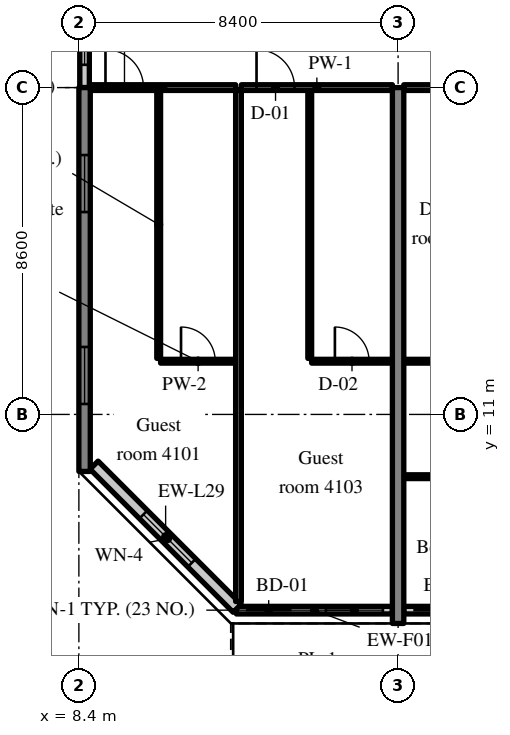
"""IFC4 building model, lengths in metres.
Left out: names, types, materials, properties, quantities, classifications, styles, units other than length and angle.
Written with IfcOpenShell. Run it as: python <this file> out.ifc"""

import sys

from ifc_helpers import new_model, si_unit, direction, frame, frame_2d, origin, place, context, subcontext, project, spatial, rectangle, extrude, source, transform, mapped, element, fill, save


model = new_model("IFC4")
c1 = context("Model", 3, precision=1e-05, world=origin(), true_north=direction((0.0, 1.0)))
c2 = subcontext(c1, "Body", "Model", "MODEL_VIEW")
j1 = project(units=[si_unit("LENGTHUNIT", "METRE"), si_unit("PLANEANGLEUNIT", "RADIAN")], contexts=[c1])
p1 = place(None, origin())
s1 = spatial("IfcSite", under=j1, at=p1, CompositionType="ELEMENT")
p2 = place(p1, origin())
s2 = spatial("IfcBuilding", under=s1, at=p2, CompositionType="ELEMENT")
p3 = place(p2, frame((0.0, 0.0, 170.6)))
s3 = spatial("IfcBuildingStorey", under=s2, at=p3, CompositionType="ELEMENT", Elevation=170.6)
m1 = source(origin(), c2, "Body", "SweptSolid", [
    extrude(rectangle(XDim=10.1, YDim=0.3, at=frame_2d((5.05, 0.0))), origin(), (0.0, 0.0, 1.0), 3.52),
])
p4 = place(p3, frame((8.55, 9.5, 0.0), z_axis=(0.0, 0.0, 1.0), x_axis=(0.0, 1.0, 0.0)))
e1 = element("IfcWall", 1, at=p4, inside=s3, PredefinedType="SHEAR", context=c2, shape_type="MappedRepresentation", body=[
    mapped(m1, transform((0.0, 0.0, 0.0), scale=1.0)),
])
m2 = source(origin(), c2, "Body", "SweptSolid", [
    extrude(rectangle(XDim=1.5, YDim=1.5, at=frame_2d((0.75, 0.75))), frame((0.0, 0.16, 0.0), z_axis=(0.0, -1.0, 0.0), x_axis=(1.0, 0.0, 0.0)), (0.0, 0.0, 1.0), 0.32),
])
p5 = place(p4, frame((1.775, 0.0, 0.9)))
e2 = element("IfcOpeningElement", 2, at=p5, cuts=e1, PredefinedType="OPENING", context=c2, shape_type="MappedRepresentation", body=[
    mapped(m2, transform((0.0, 0.0, 0.0), scale=1.0)),
])
p6 = place(p4, frame((6.825, 0.0, 0.9)))
e3 = element("IfcOpeningElement", 3, at=p6, cuts=e1, PredefinedType="OPENING", context=c2, shape_type="MappedRepresentation", body=[
    mapped(m2, transform((0.0, 0.0, 0.0), scale=1.0)),
])
m3 = source(origin(), c2, "Body", "SweptSolid", [
    extrude(rectangle(XDim=14.1, YDim=0.3, at=frame_2d((7.05, 0.0))), origin(), (0.0, 0.0, 1.0), 3.52),
])
p7 = place(p3, frame((16.8, 5.5, 0.0), z_axis=(0.0, 0.0, 1.0), x_axis=(0.0, 1.0, 0.0)))
e4 = element("IfcWall", 4, at=p7, inside=s3, PredefinedType="SHEAR", context=c2, shape_type="MappedRepresentation", body=[
    mapped(m3, transform((0.0, 0.0, 0.0), scale=1.0)),
])
m4 = source(origin(), c2, "Body", "SweptSolid", [
    extrude(rectangle(XDim=4.105, YDim=0.2, at=frame_2d((2.052, 0.0))), origin(), (0.0, 0.0, 1.0), 2.87),
])
p8 = place(p3, frame((12.545, 5.85, 0.0), z_axis=(0.0, 0.0, 1.0), x_axis=(1.0, 0.0, 0.0)))
e5 = element("IfcWall", 5, at=p8, inside=s3, PredefinedType="SOLIDWALL", context=c2, shape_type="MappedRepresentation", body=[
    mapped(m4, transform((0.0, 0.0, 0.0), scale=1.0)),
])
m5 = source(origin(), c2, "Body", "SweptSolid", [
    extrude(rectangle(XDim=1.2, YDim=2.4, at=frame_2d((0.6, 1.2))), frame((0.0, 0.11, 0.0), z_axis=(0.0, -1.0, 0.0), x_axis=(1.0, 0.0, 0.0)), (0.0, 0.0, 1.0), 0.22),
])
p9 = place(p8, frame((0.25, 0.0, 0.0)))
e6 = element("IfcOpeningElement", 6, at=p9, cuts=e5, PredefinedType="OPENING", context=c2, shape_type="MappedRepresentation", body=[
    mapped(m5, transform((0.0, 0.0, 0.0), scale=1.0)),
])
m6 = source(origin(), c2, "Body", "SweptSolid", [
    extrude(rectangle(XDim=1.5, YDim=1.5, at=frame_2d((0.75, 0.75))), frame((0.0, 0.11, 0.0), z_axis=(0.0, -1.0, 0.0), x_axis=(1.0, 0.0, 0.0)), (0.0, 0.0, 1.0), 0.22),
])
p10 = place(p8, frame((2.355, 0.0, 0.9)))
e7 = element("IfcOpeningElement", 7, at=p10, cuts=e5, PredefinedType="OPENING", context=c2, shape_type="MappedRepresentation", body=[
    mapped(m6, transform((0.0, 0.0, 0.0), scale=1.0)),
])
m7 = source(origin(), c2, "Body", "SweptSolid", [
    extrude(rectangle(XDim=8.1, YDim=0.2, at=frame_2d((4.05, 0.0))), origin(), (0.0, 0.0, 1.0), 2.87),
])
p11 = place(p3, frame((16.95, 5.85, 0.0), z_axis=(0.0, 0.0, 1.0), x_axis=(1.0, 0.0, 0.0)))
e8 = element("IfcWall", 8, at=p11, inside=s3, PredefinedType="SOLIDWALL", context=c2, shape_type="MappedRepresentation", body=[
    mapped(m7, transform((0.0, 0.0, 0.0), scale=1.0)),
])
p12 = place(p11, frame((0.25, 0.0, 0.0)))
e9 = element("IfcOpeningElement", 9, at=p12, cuts=e8, PredefinedType="OPENING", context=c2, shape_type="MappedRepresentation", body=[
    mapped(m5, transform((0.0, 0.0, 0.0), scale=1.0)),
])
p13 = place(p11, frame((2.3, 0.0, 0.9)))
e10 = element("IfcOpeningElement", 10, at=p13, cuts=e8, PredefinedType="OPENING", context=c2, shape_type="MappedRepresentation", body=[
    mapped(m6, transform((0.0, 0.0, 0.0), scale=1.0)),
])
p14 = place(p11, frame((4.3, 0.0, 0.0)))
e11 = element("IfcOpeningElement", 11, at=p14, cuts=e8, PredefinedType="OPENING", context=c2, shape_type="MappedRepresentation", body=[
    mapped(m5, transform((0.0, 0.0, 0.0), scale=1.0)),
])
p15 = place(p11, frame((6.35, 0.0, 0.9)))
e12 = element("IfcOpeningElement", 12, at=p15, cuts=e8, PredefinedType="OPENING", context=c2, shape_type="MappedRepresentation", body=[
    mapped(m6, transform((0.0, 0.0, 0.0), scale=1.0)),
])
m8 = source(origin(), c2, "Body", "SweptSolid", [
    extrude(rectangle(XDim=5.326, YDim=0.3, at=frame_2d((2.663, 0.0))), origin(), (0.0, 0.0, 1.0), 3.52),
])
p16 = place(p3, frame((8.8, 9.666, 0.0), z_axis=(0.0, 0.0, 1.0), x_axis=(0.707083859269, -0.707129702361, 0.0)))
e13 = element("IfcWall", 13, at=p16, inside=s3, PredefinedType="SOLIDWALL", context=c2, shape_type="MappedRepresentation", body=[
    mapped(m8, transform((0.0, 0.0, 0.0), scale=1.0)),
])
m9 = source(origin(), c2, "Body", "SweptSolid", [
    extrude(rectangle(XDim=1.8, YDim=1.5, at=frame_2d((0.9, 0.75))), frame((0.0, 0.16, 0.0), z_axis=(0.0, -1.0, 0.0), x_axis=(1.0, 0.0, 0.0)), (0.0, 0.0, 1.0), 0.32),
])
p17 = place(p16, frame((1.836, 0.0, 0.9)))
e14 = element("IfcOpeningElement", 14, at=p17, cuts=e13, PredefinedType="OPENING", context=c2, shape_type="MappedRepresentation", body=[
    mapped(m9, transform((0.0, 0.0, 0.0), scale=1.0)),
])
m10 = source(origin(), c2, "Body", "SweptSolid", [
    extrude(rectangle(XDim=2.4, YDim=0.25, at=frame_2d((1.2, 0.0))), origin(), (0.0, 0.0, 1.0), 2.62),
])
p18 = place(p3, frame((8.55, 19.6, 0.0), z_axis=(0.0, 0.0, 1.0), x_axis=(0.0, 1.0, 0.0)))
e15 = element("IfcWall", 15, at=p18, inside=s3, PredefinedType="SOLIDWALL", context=c2, shape_type="MappedRepresentation", body=[
    mapped(m10, transform((0.0, 0.0, 0.0), scale=1.0)),
])
m11 = source(origin(), c2, "Body", "SweptSolid", [
    extrude(rectangle(XDim=1.2, YDim=1.5, at=frame_2d((0.6, 0.75))), frame((0.0, 0.135, 0.0), z_axis=(0.0, -1.0, 0.0), x_axis=(1.0, 0.0, 0.0)), (0.0, 0.0, 1.0), 0.27),
])
p19 = place(p18, frame((0.6, 0.0, 0.9)))
e16 = element("IfcOpeningElement", 16, at=p19, cuts=e15, PredefinedType="OPENING", context=c2, shape_type="MappedRepresentation", body=[
    mapped(m11, transform((0.0, 0.0, 0.0), scale=1.0)),
])
m12 = source(origin(), c2, "Body", "SweptSolid", [
    extrude(rectangle(XDim=7.05, YDim=0.1, at=frame_2d((3.525, 0.0))), origin(), (0.0, 0.0, 1.0), 3.52),
])
p20 = place(p3, frame((10.5, 12.475, 0.0), z_axis=(0.0, 0.0, 1.0), x_axis=(0.0, 1.0, 0.0)))
e17 = element("IfcWall", 17, at=p20, inside=s3, PredefinedType="PARTITIONING", context=c2, shape_type="MappedRepresentation", body=[
    mapped(m12, transform((0.0, 0.0, 0.0), scale=1.0)),
])
m13 = source(origin(), c2, "Body", "SweptSolid", [
    extrude(rectangle(XDim=1.975, YDim=0.1, at=frame_2d((0.987, 0.0))), origin(), (0.0, 0.0, 1.0), 3.52),
])
p21 = place(p3, frame((10.55, 12.4, 0.0), z_axis=(0.0, 0.0, 1.0), x_axis=(1.0, 0.0, 0.0)))
e18 = element("IfcWall", 18, at=p21, inside=s3, PredefinedType="PARTITIONING", context=c2, shape_type="MappedRepresentation", body=[
    mapped(m13, transform((0.0, 0.0, 0.0), scale=1.0)),
])
m14 = source(origin(), c2, "Body", "SweptSolid", [
    extrude(rectangle(XDim=0.9, YDim=2.1, at=frame_2d((0.45, 1.05))), frame((0.0, 0.06, 0.0), z_axis=(0.0, -1.0, 0.0), x_axis=(1.0, 0.0, 0.0)), (0.0, 0.0, 1.0), 0.12),
])
p22 = place(p21, frame((0.538, 0.0, 0.0)))
e19 = element("IfcOpeningElement", 19, at=p22, cuts=e18, PredefinedType="OPENING", context=c2, shape_type="MappedRepresentation", body=[
    mapped(m14, transform((0.0, 0.0, 0.0), scale=1.0)),
])
m15 = source(origin(), c2, "Body", "SweptSolid", [
    extrude(rectangle(XDim=3.825, YDim=0.15, at=frame_2d((1.913, 0.0))), origin(), (0.0, 0.0, 1.0), 2.82),
])
p23 = place(p3, frame((8.7, 19.6, 0.0), z_axis=(0.0, 0.0, 1.0), x_axis=(1.0, 0.0, 0.0)))
e20 = element("IfcWall", 20, at=p23, inside=s3, PredefinedType="PARTITIONING", context=c2, shape_type="MappedRepresentation", body=[
    mapped(m15, transform((0.0, 0.0, 0.0), scale=1.0)),
])
m16 = source(origin(), c2, "Body", "SweptSolid", [
    extrude(rectangle(XDim=1.0, YDim=2.1, at=frame_2d((0.5, 1.05))), frame((0.0, 0.085, 0.0), z_axis=(0.0, -1.0, 0.0), x_axis=(1.0, 0.0, 0.0)), (0.0, 0.0, 1.0), 0.17),
])
p24 = place(p23, frame((0.4, 0.0, 0.0)))
e21 = element("IfcOpeningElement", 21, at=p24, cuts=e20, PredefinedType="OPENING", context=c2, shape_type="MappedRepresentation", body=[
    mapped(m16, transform((0.0, 0.0, 0.0), scale=1.0)),
])
p25 = place(p3, frame((14.475, 12.475, 0.0), z_axis=(0.0, 0.0, 1.0), x_axis=(0.0, 1.0, 0.0)))
e22 = element("IfcWall", 22, at=p25, inside=s3, PredefinedType="PARTITIONING", context=c2, shape_type="MappedRepresentation", body=[
    mapped(m12, transform((0.0, 0.0, 0.0), scale=1.0)),
])
m17 = source(origin(), c2, "Body", "SweptSolid", [
    extrude(rectangle(XDim=2.125, YDim=0.1, at=frame_2d((1.062, 0.0))), origin(), (0.0, 0.0, 1.0), 3.52),
])
p26 = place(p3, frame((14.525, 12.4, 0.0), z_axis=(0.0, 0.0, 1.0), x_axis=(1.0, 0.0, 0.0)))
e23 = element("IfcWall", 23, at=p26, inside=s3, PredefinedType="PARTITIONING", context=c2, shape_type="MappedRepresentation", body=[
    mapped(m17, transform((0.0, 0.0, 0.0), scale=1.0)),
])
p27 = place(p26, frame((0.612, 0.0, 0.0)))
e24 = element("IfcOpeningElement", 24, at=p27, cuts=e23, PredefinedType="OPENING", context=c2, shape_type="MappedRepresentation", body=[
    mapped(m14, transform((0.0, 0.0, 0.0), scale=1.0)),
])
m18 = source(origin(), c2, "Body", "SweptSolid", [
    extrude(rectangle(XDim=3.975, YDim=0.15, at=frame_2d((1.987, 0.0))), origin(), (0.0, 0.0, 1.0), 2.82),
])
p28 = place(p3, frame((12.675, 19.6, 0.0), z_axis=(0.0, 0.0, 1.0), x_axis=(1.0, 0.0, 0.0)))
e25 = element("IfcWall", 25, at=p28, inside=s3, PredefinedType="PARTITIONING", context=c2, shape_type="MappedRepresentation", body=[
    mapped(m18, transform((0.0, 0.0, 0.0), scale=1.0)),
])
p29 = place(p28, frame((0.4, 0.0, 0.0)))
e26 = element("IfcOpeningElement", 26, at=p29, cuts=e25, PredefinedType="OPENING", context=c2, shape_type="MappedRepresentation", body=[
    mapped(m16, transform((0.0, 0.0, 0.0), scale=1.0)),
])
m19 = source(origin(), c2, "Body", "SweptSolid", [
    extrude(rectangle(XDim=13.447, YDim=0.15, at=frame_2d((6.724, 0.0))), origin(), (0.0, 0.0, 1.0), 3.52),
])
p30 = place(p3, frame((12.6, 6.078, 0.0), z_axis=(0.0, 0.0, 1.0), x_axis=(0.0, 1.0, 0.0)))
e27 = element("IfcWall", 27, at=p30, inside=s3, PredefinedType="PARTITIONING", context=c2, shape_type="MappedRepresentation", body=[
    mapped(m19, transform((0.0, 0.0, 0.0), scale=1.0)),
])
m20 = source(origin(), c2, "Body", "SweptSolid", [
    extrude(rectangle(XDim=2.65, YDim=0.1, at=frame_2d((1.325, 0.0))), origin(), (0.0, 0.0, 1.0), 3.52),
])
p31 = place(p3, frame((16.95, 12.4, 0.0), z_axis=(0.0, 0.0, 1.0), x_axis=(1.0, 0.0, 0.0)))
e28 = element("IfcWall", 28, at=p31, inside=s3, PredefinedType="PARTITIONING", context=c2, shape_type="MappedRepresentation", body=[
    mapped(m20, transform((0.0, 0.0, 0.0), scale=1.0)),
])
p32 = place(p31, frame((0.875, 0.0, 0.0)))
e29 = element("IfcOpeningElement", 29, at=p32, cuts=e28, PredefinedType="OPENING", context=c2, shape_type="MappedRepresentation", body=[
    mapped(m14, transform((0.0, 0.0, 0.0), scale=1.0)),
])
m21 = source(origin(), c2, "Body", "SweptSolid", [
    extrude(rectangle(XDim=8.1, YDim=0.1, at=frame_2d((4.05, 0.0))), origin(), (0.0, 0.0, 1.0), 3.52),
])
p33 = place(p3, frame((16.95, 9.362, 0.0), z_axis=(0.0, 0.0, 1.0), x_axis=(1.0, 0.0, 0.0)))
e30 = element("IfcWall", 30, at=p33, inside=s3, PredefinedType="PARTITIONING", context=c2, shape_type="MappedRepresentation", body=[
    mapped(m21, transform((0.0, 0.0, 0.0), scale=1.0)),
])
m22 = source(origin(), c2, "Body", "SweptSolid", [
    extrude(rectangle(XDim=1.8, YDim=2.1, at=frame_2d((0.9, 1.05))), frame((0.0, 0.06, 0.0), z_axis=(0.0, -1.0, 0.0), x_axis=(1.0, 0.0, 0.0)), (0.0, 0.0, 1.0), 0.12),
])
p34 = place(p33, frame((3.15, 0.0, 0.0)))
e31 = element("IfcOpeningElement", 31, at=p34, cuts=e30, PredefinedType="OPENING", context=c2, shape_type="MappedRepresentation", body=[
    mapped(m22, transform((0.0, 0.0, 0.0), scale=1.0)),
])
m23 = source(origin(), c2, "Body", "SweptSolid", [
    extrude(rectangle(XDim=8.1, YDim=0.15, at=frame_2d((4.05, 0.0))), origin(), (0.0, 0.0, 1.0), 2.82),
])
p35 = place(p3, frame((16.95, 19.6, 0.0), z_axis=(0.0, 0.0, 1.0), x_axis=(1.0, 0.0, 0.0)))
e32 = element("IfcWall", 32, at=p35, inside=s3, PredefinedType="PARTITIONING", context=c2, shape_type="MappedRepresentation", body=[
    mapped(m23, transform((0.0, 0.0, 0.0), scale=1.0)),
])
p36 = place(p35, frame((6.7, 0.0, 0.0)))
e33 = element("IfcOpeningElement", 33, at=p36, cuts=e32, PredefinedType="OPENING", context=c2, shape_type="MappedRepresentation", body=[
    mapped(m16, transform((0.0, 0.0, 0.0), scale=1.0)),
])
m24 = source(origin(), c2, "Body", "SweptSolid", [
    extrude(rectangle(XDim=1.2, YDim=2.4, at=frame_2d((0.6, 1.2))), frame((0.0, 0.025, 0.0), z_axis=(0.0, -1.0, 0.0), x_axis=(1.0, 0.0, 0.0)), (0.0, 0.0, 1.0), 0.05),
])
p37 = place(p9, origin())
e34 = element("IfcDoor", 34, at=p37, inside=s3, OperationType="SLIDING_TO_LEFT", PredefinedType="DOOR", context=c2, shape_type="MappedRepresentation", body=[
    mapped(m24, transform((0.0, 0.0, 0.0), scale=1.0)),
])
fill(e6, e34)
m25 = source(origin(), c2, "Body", "SweptSolid", [
    extrude(rectangle(XDim=1.5, YDim=1.5, at=frame_2d((0.75, 0.75))), frame((0.0, 0.03, 0.0), z_axis=(0.0, -1.0, 0.0), x_axis=(1.0, 0.0, 0.0)), (0.0, 0.0, 1.0), 0.06),
])
p38 = place(p10, origin())
e35 = element("IfcWindow", 35, at=p38, inside=s3, PartitioningType="SINGLE_PANEL", PredefinedType="WINDOW", context=c2, shape_type="MappedRepresentation", body=[
    mapped(m25, transform((0.0, 0.0, 0.0), scale=1.0)),
])
fill(e7, e35)
p39 = place(p12, origin())
e36 = element("IfcDoor", 36, at=p39, inside=s3, OperationType="SLIDING_TO_RIGHT", PredefinedType="DOOR", context=c2, shape_type="MappedRepresentation", body=[
    mapped(m24, transform((0.0, 0.0, 0.0), scale=1.0)),
])
fill(e9, e36)
m26 = source(origin(), c2, "Body", "SweptSolid", [
    extrude(rectangle(XDim=1.8, YDim=1.5, at=frame_2d((0.9, 0.75))), frame((0.0, 0.03, 0.0), z_axis=(0.0, -1.0, 0.0), x_axis=(1.0, 0.0, 0.0)), (0.0, 0.0, 1.0), 0.06),
])
p40 = place(p17, origin())
e37 = element("IfcWindow", 37, at=p40, inside=s3, PartitioningType="SINGLE_PANEL", PredefinedType="WINDOW", context=c2, shape_type="MappedRepresentation", body=[
    mapped(m26, transform((0.0, 0.0, 0.0), scale=1.0)),
])
fill(e14, e37)
p41 = place(p5, origin())
e38 = element("IfcWindow", 38, at=p41, inside=s3, PartitioningType="SINGLE_PANEL", PredefinedType="WINDOW", context=c2, shape_type="MappedRepresentation", body=[
    mapped(m25, transform((0.0, 0.0, 0.0), scale=1.0)),
])
fill(e2, e38)
p42 = place(p6, origin())
e39 = element("IfcWindow", 39, at=p42, inside=s3, PartitioningType="SINGLE_PANEL", PredefinedType="WINDOW", context=c2, shape_type="MappedRepresentation", body=[
    mapped(m25, transform((0.0, 0.0, 0.0), scale=1.0)),
])
fill(e3, e39)
m27 = source(origin(), c2, "Body", "SweptSolid", [
    extrude(rectangle(XDim=1.2, YDim=1.5, at=frame_2d((0.6, 0.75))), frame((0.0, 0.03, 0.0), z_axis=(0.0, -1.0, 0.0), x_axis=(1.0, 0.0, 0.0)), (0.0, 0.0, 1.0), 0.06),
])
p43 = place(p19, origin())
e40 = element("IfcWindow", 40, at=p43, inside=s3, PartitioningType="SINGLE_PANEL", PredefinedType="WINDOW", context=c2, shape_type="MappedRepresentation", body=[
    mapped(m27, transform((0.0, 0.0, 0.0), scale=1.0)),
])
fill(e16, e40)
m28 = source(origin(), c2, "Body", "SweptSolid", [
    extrude(rectangle(XDim=0.9, YDim=2.1, at=frame_2d((0.45, 1.05))), frame((0.0, 0.025, 0.0), z_axis=(0.0, -1.0, 0.0), x_axis=(1.0, 0.0, 0.0)), (0.0, 0.0, 1.0), 0.05),
])
p44 = place(p22, origin())
e41 = element("IfcDoor", 41, at=p44, inside=s3, OperationType="SINGLE_SWING_LEFT", PredefinedType="DOOR", context=c2, shape_type="MappedRepresentation", body=[
    mapped(m28, transform((0.0, 0.0, 0.0), scale=1.0)),
])
fill(e19, e41)
m29 = source(origin(), c2, "Body", "SweptSolid", [
    extrude(rectangle(XDim=1.0, YDim=2.1, at=frame_2d((0.5, 1.05))), frame((0.0, 0.025, 0.0), z_axis=(0.0, -1.0, 0.0), x_axis=(1.0, 0.0, 0.0)), (0.0, 0.0, 1.0), 0.05),
])
p45 = place(p24, origin())
e42 = element("IfcDoor", 42, at=p45, inside=s3, OperationType="SINGLE_SWING_LEFT", PredefinedType="DOOR", context=c2, shape_type="MappedRepresentation", body=[
    mapped(m29, transform((0.0, 0.0, 0.0), scale=1.0)),
])
fill(e21, e42)
p46 = place(p27, origin())
e43 = element("IfcDoor", 43, at=p46, inside=s3, OperationType="SINGLE_SWING_LEFT", PredefinedType="DOOR", context=c2, shape_type="MappedRepresentation", body=[
    mapped(m28, transform((0.0, 0.0, 0.0), scale=1.0)),
])
fill(e24, e43)
p47 = place(p29, origin())
e44 = element("IfcDoor", 44, at=p47, inside=s3, OperationType="SINGLE_SWING_LEFT", PredefinedType="DOOR", context=c2, shape_type="MappedRepresentation", body=[
    mapped(m29, transform((0.0, 0.0, 0.0), scale=1.0)),
])
fill(e26, e44)
save(model, sys.argv[1])
